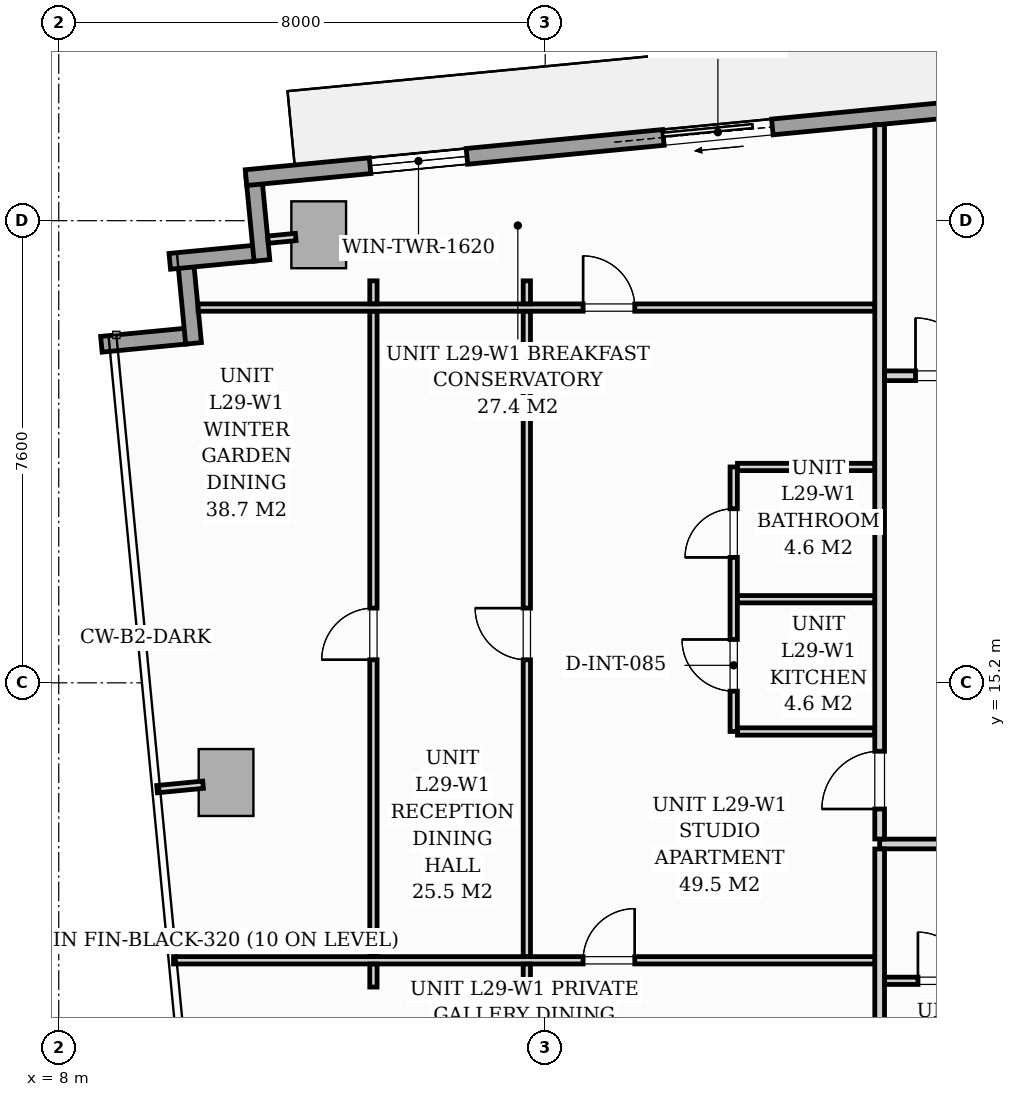
"""IFC4 building model, lengths in metres.
Left out: names, types, materials, properties, quantities, classifications, styles, units other than length and angle.
Written with IfcOpenShell. Run it as: python <this file> out.ifc"""

import sys

from ifc_helpers import new_model, si_unit, direction, frame, frame_2d, origin, origin_2d, place, context, subcontext, project, spatial, rectangle, extrude, source, transform, mapped, element, fill, save


model = new_model("IFC4")
c1 = context("Model", 3, precision=1e-05, world=origin(), true_north=direction((0.0, 1.0)))
c2 = subcontext(c1, "Body", "Model", "MODEL_VIEW")
j1 = project(units=[si_unit("LENGTHUNIT", "METRE"), si_unit("PLANEANGLEUNIT", "RADIAN")], contexts=[c1])
p1 = place(None, origin())
s1 = spatial("IfcSite", under=j1, at=p1, CompositionType="ELEMENT")
p2 = place(p1, origin())
s2 = spatial("IfcBuilding", under=s1, at=p2, CompositionType="ELEMENT")
p3 = place(p2, frame((0.0, 0.0, 103.4)))
s3 = spatial("IfcBuildingStorey", under=s2, at=p3, CompositionType="ELEMENT", Elevation=103.4)
m1 = source(origin(), c2, "Body", "SweptSolid", [
    extrude(rectangle(XDim=0.9, YDim=1.1, at=origin_2d()), origin(), (0.0, 0.0, 1.0), 3.196),
])
for number, where, z_axis, x_axis in (
    (1, (12.275, 22.568, 0.002), (0.0, 0.0, 1.0), (0.995, 0.096, 0.0)),
    (2, (10.752, 13.561, 0.002), (0.0, 0.0, 1.0), (0.995, 0.096, 0.0)),
):
    element("IfcColumn", number, at=place(p3, frame(where, z_axis=z_axis, x_axis=x_axis)), inside=s3, PredefinedType="COLUMN", context=c2, shape_type="MappedRepresentation", body=[
        mapped(m1, transform((0.0, 0.0, 0.0), scale=1.0)),
    ])
for number, where, z_axis, x_axis in (
    (3, (8.701, 20.767, 0.0), (0.0, 0.0, 1.0), (0.995, 0.096, 0.0)),
    (4, (10.217, 20.783, 0.0), (0.0, 0.0, 1.0), (-0.096, 0.995, 0.0)),
):
    element("IfcWall", number, at=place(p3, frame(where, z_axis=z_axis, x_axis=x_axis)), inside=s3, PredefinedType="STANDARD", context=c2, shape_type="SweptSolid", body=[
        extrude(rectangle(XDim=1.395, YDim=0.26, at=frame_2d((0.698, 0.0))), origin(), (0.0, 0.0, 1.0), 2.94),
    ])
p4 = place(p3, frame((9.826, 22.131, 0.0), z_axis=(0.0, 0.0, 1.0), x_axis=(0.995389446633, 0.095915846097, 0.0)))
e5 = element("IfcWall", 5, at=p4, inside=s3, PredefinedType="STANDARD", context=c2, shape_type="SweptSolid", body=[
    extrude(rectangle(XDim=1.395, YDim=0.26, at=frame_2d((0.697, 0.0))), origin(), (0.0, 0.0, 1.0), 2.94),
])
p5 = place(p3, frame((11.341, 22.147, 0.0), z_axis=(0.0, 0.0, 1.0), x_axis=(-0.09589913835, 0.995391056452, 0.0)))
e6 = element("IfcWall", 6, at=p5, inside=s3, PredefinedType="STANDARD", context=c2, shape_type="SweptSolid", body=[
    extrude(rectangle(XDim=1.395, YDim=0.26, at=frame_2d((0.698, 0.0))), origin(), (0.0, 0.0, 1.0), 2.94),
])
p6 = place(p3, frame((11.08, 23.508, 0.0), z_axis=(0.0, 0.0, 1.0), x_axis=(0.995396638587, 0.095841180552, 0.0)))
e7 = element("IfcWall", 7, at=p6, inside=s3, PredefinedType="STANDARD", context=c2, shape_type="SweptSolid", body=[
    extrude(rectangle(XDim=19.11, YDim=0.26, at=frame_2d((9.555, 0.0))), origin(), (0.0, 0.0, 1.0), 2.94),
])
p7 = place(p6, frame((6.896, 0.0, 0.0)))
e8 = element("IfcOpeningElement", 8, at=p7, cuts=e7, PredefinedType="OPENING", context=c2, shape_type="SweptSolid", body=[
    extrude(rectangle(XDim=1.8, YDim=2.06, at=frame_2d((0.9, 1.03))), frame((0.0, 0.14, 0.0), z_axis=(0.0, -1.0, 0.0), x_axis=(1.0, 0.0, 0.0)), (0.0, 0.0, 1.0), 0.28),
])
p8 = place(p6, frame((2.05, 0.0, 0.65)))
e9 = element("IfcOpeningElement", 9, at=p8, cuts=e7, PredefinedType="OPENING", context=c2, shape_type="SweptSolid", body=[
    extrude(rectangle(XDim=1.6, YDim=1.5, at=frame_2d((0.8, 0.75))), frame((0.0, 0.14, 0.0), z_axis=(0.0, -1.0, 0.0), x_axis=(1.0, 0.0, 0.0)), (0.0, 0.0, 1.0), 0.28),
])
p9 = place(p3, frame((21.5, 12.55, 0.0), z_axis=(0.0, 0.0, 1.0), x_axis=(1.0, 0.0, 0.0)))
e10 = element("IfcWall", 10, at=p9, inside=s3, PredefinedType="PARTITIONING", context=c2, shape_type="SweptSolid", body=[
    extrude(rectangle(XDim=24.38, YDim=0.16, at=frame_2d((12.19, 0.0))), origin(), (0.0, 0.0, 1.0), 2.94),
])
p10 = place(p9, frame((6.075, 0.0, 0.0)))
e11 = element("IfcOpeningElement", 11, at=p10, cuts=e10, PredefinedType="OPENING", context=c2, shape_type="SweptSolid", body=[
    extrude(rectangle(XDim=0.95, YDim=2.06, at=frame_2d((0.475, 1.03))), frame((0.0, 0.09, 0.0), z_axis=(0.0, -1.0, 0.0), x_axis=(1.0, 0.0, 0.0)), (0.0, 0.0, 1.0), 0.18),
])
p11 = place(p9, frame((10.519, 0.0, 0.0)))
e12 = element("IfcOpeningElement", 12, at=p11, cuts=e10, PredefinedType="OPENING", context=c2, shape_type="SweptSolid", body=[
    extrude(rectangle(XDim=0.95, YDim=2.06, at=frame_2d((0.475, 1.03))), frame((0.0, 0.09, 0.0), z_axis=(0.0, -1.0, 0.0), x_axis=(1.0, 0.0, 0.0)), (0.0, 0.0, 1.0), 0.18),
])
p12 = place(p9, frame((18.208, 0.0, 0.0)))
e13 = element("IfcOpeningElement", 13, at=p12, cuts=e10, PredefinedType="OPENING", context=c2, shape_type="SweptSolid", body=[
    extrude(rectangle(XDim=0.95, YDim=2.06, at=frame_2d((0.475, 1.03))), frame((0.0, 0.09, 0.0), z_axis=(0.0, -1.0, 0.0), x_axis=(1.0, 0.0, 0.0)), (0.0, 0.0, 1.0), 0.18),
])
p13 = place(p3, frame((21.5, 4.812, 0.0), z_axis=(0.0, 0.0, 1.0), x_axis=(0.0, 1.0, 0.0)))
e14 = element("IfcWall", 14, at=p13, inside=s3, PredefinedType="PARTITIONING", context=c2, shape_type="SweptSolid", body=[
    extrude(rectangle(XDim=7.656, YDim=0.16, at=frame_2d((3.828, 0.0))), origin(), (0.0, 0.0, 1.0), 2.94),
])
p14 = place(p3, frame((21.5, 12.632, 0.0), z_axis=(0.0, 0.0, 1.0), x_axis=(0.0, 1.0, 0.0)))
e15 = element("IfcWall", 15, at=p14, inside=s3, PredefinedType="PARTITIONING", context=c2, shape_type="SweptSolid", body=[
    extrude(rectangle(XDim=11.747, YDim=0.16, at=frame_2d((5.873, 0.0))), origin(), (0.0, 0.0, 1.0), 2.94),
])
p15 = place(p14, frame((0.493, 0.0, 0.0)))
e16 = element("IfcOpeningElement", 16, at=p15, cuts=e15, PredefinedType="OPENING", context=c2, shape_type="SweptSolid", body=[
    extrude(rectangle(XDim=0.95, YDim=2.06, at=frame_2d((0.475, 1.03))), frame((0.0, 0.09, 0.0), z_axis=(0.0, -1.0, 0.0), x_axis=(1.0, 0.0, 0.0)), (0.0, 0.0, 1.0), 0.18),
])
p16 = place(p3, frame((21.582, 10.3, 0.0), z_axis=(0.0, 0.0, 1.0), x_axis=(1.0, 0.0, 0.0)))
e17 = element("IfcWall", 17, at=p16, inside=s3, PredefinedType="PARTITIONING", context=c2, shape_type="SweptSolid", body=[
    extrude(rectangle(XDim=4.098, YDim=0.12, at=frame_2d((2.049, 0.0))), origin(), (0.0, 0.0, 1.0), 2.94),
])
p17 = place(p16, frame((0.548, 0.0, 0.0)))
e18 = element("IfcOpeningElement", 18, at=p17, cuts=e17, PredefinedType="OPENING", context=c2, shape_type="SweptSolid", body=[
    extrude(rectangle(XDim=0.8, YDim=2.02, at=frame_2d((0.4, 1.01))), frame((0.0, 0.07, 0.0), z_axis=(0.0, -1.0, 0.0), x_axis=(1.0, 0.0, 0.0)), (0.0, 0.0, 1.0), 0.14),
])
p18 = place(p16, frame((2.573, 0.0, 0.0)))
e19 = element("IfcOpeningElement", 19, at=p18, cuts=e17, PredefinedType="OPENING", context=c2, shape_type="SweptSolid", body=[
    extrude(rectangle(XDim=0.85, YDim=2.05, at=frame_2d((0.425, 1.025))), frame((0.0, 0.07, 0.0), z_axis=(0.0, -1.0, 0.0), x_axis=(1.0, 0.0, 0.0)), (0.0, 0.0, 1.0), 0.14),
])
p19 = place(p3, frame((19.1, 14.4, 0.0), z_axis=(0.0, 0.0, 1.0), x_axis=(0.0, 1.0, 0.0)))
e20 = element("IfcWall", 20, at=p19, inside=s3, PredefinedType="PARTITIONING", context=c2, shape_type="SweptSolid", body=[
    extrude(rectangle(XDim=4.35, YDim=0.12, at=frame_2d((2.175, 0.0))), origin(), (0.0, 0.0, 1.0), 2.94),
])
p20 = place(p19, frame((0.663, 0.0, 0.0)))
e21 = element("IfcOpeningElement", 21, at=p20, cuts=e20, PredefinedType="OPENING", context=c2, shape_type="SweptSolid", body=[
    extrude(rectangle(XDim=0.85, YDim=2.05, at=frame_2d((0.425, 1.025))), frame((0.0, 0.07, 0.0), z_axis=(0.0, -1.0, 0.0), x_axis=(1.0, 0.0, 0.0)), (0.0, 0.0, 1.0), 0.14),
])
p21 = place(p19, frame((2.863, 0.0, 0.0)))
e22 = element("IfcOpeningElement", 22, at=p21, cuts=e20, PredefinedType="OPENING", context=c2, shape_type="SweptSolid", body=[
    extrude(rectangle(XDim=0.8, YDim=2.02, at=frame_2d((0.4, 1.01))), frame((0.0, 0.07, 0.0), z_axis=(0.0, -1.0, 0.0), x_axis=(1.0, 0.0, 0.0)), (0.0, 0.0, 1.0), 0.14),
])
for number, where, z_axis, x_axis in (
    (23, (19.162, 16.575, 0.0), (0.0, 0.0, 1.0), (1.0, 0.0, 0.0)),
    (24, (19.162, 14.4, 0.0), (0.0, 0.0, 1.0), (1.0, 0.0, 0.0)),
    (25, (19.162, 18.75, 0.0), (0.0, 0.0, 1.0), (1.0, 0.0, 0.0)),
):
    element("IfcWall", number, at=place(p3, frame(where, z_axis=z_axis, x_axis=x_axis)), inside=s3, PredefinedType="PARTITIONING", context=c2, shape_type="SweptSolid", body=[
        extrude(rectangle(XDim=2.256, YDim=0.12, at=frame_2d((1.128, 0.0))), origin(), (0.0, 0.0, 1.0), 2.94),
    ])
p22 = place(p3, frame((10.293, 21.371, 0.0), z_axis=(0.0, 0.0, 1.0), x_axis=(1.0, 0.0, 0.0)))
e26 = element("IfcWall", 26, at=p22, inside=s3, PredefinedType="PARTITIONING", context=c2, shape_type="SweptSolid", body=[
    extrude(rectangle(XDim=11.125, YDim=0.12, at=frame_2d((5.562, 0.0))), origin(), (0.0, 0.0, 1.0), 2.94),
])
p23 = place(p22, frame((6.33, 0.0, 0.0)))
e27 = element("IfcOpeningElement", 27, at=p23, cuts=e26, PredefinedType="OPENING", context=c2, shape_type="SweptSolid", body=[
    extrude(rectangle(XDim=0.85, YDim=2.05, at=frame_2d((0.425, 1.025))), frame((0.0, 0.07, 0.0), z_axis=(0.0, -1.0, 0.0), x_axis=(1.0, 0.0, 0.0)), (0.0, 0.0, 1.0), 0.14),
])
p24 = place(p3, frame((9.888, 10.637, 0.0), z_axis=(0.0, 0.0, 1.0), x_axis=(1.0, 0.0, 0.0)))
e28 = element("IfcWall", 28, at=p24, inside=s3, PredefinedType="PARTITIONING", context=c2, shape_type="SweptSolid", body=[
    extrude(rectangle(XDim=11.53, YDim=0.12, at=frame_2d((5.765, 0.0))), origin(), (0.0, 0.0, 1.0), 2.94),
])
p25 = place(p24, frame((6.735, 0.0, 0.0)))
e29 = element("IfcOpeningElement", 29, at=p25, cuts=e28, PredefinedType="OPENING", context=c2, shape_type="SweptSolid", body=[
    extrude(rectangle(XDim=0.85, YDim=2.05, at=frame_2d((0.425, 1.025))), frame((0.0, 0.07, 0.0), z_axis=(0.0, -1.0, 0.0), x_axis=(1.0, 0.0, 0.0)), (0.0, 0.0, 1.0), 0.14),
])
p26 = place(p3, frame((13.175, 10.197, 0.0), z_axis=(0.0, 0.0, 1.0), x_axis=(0.0, 1.0, 0.0)))
e30 = element("IfcWall", 30, at=p26, inside=s3, PredefinedType="PARTITIONING", context=c2, shape_type="SweptSolid", body=[
    extrude(rectangle(XDim=0.378, YDim=0.12, at=frame_2d((0.189, 0.0))), origin(), (0.0, 0.0, 1.0), 2.94),
])
p27 = place(p3, frame((13.175, 10.699, 0.0), z_axis=(0.0, 0.0, 1.0), x_axis=(0.0, 1.0, 0.0)))
e31 = element("IfcWall", 31, at=p27, inside=s3, PredefinedType="PARTITIONING", context=c2, shape_type="SweptSolid", body=[
    extrude(rectangle(XDim=10.61, YDim=0.12, at=frame_2d((5.305, 0.0))), origin(), (0.0, 0.0, 1.0), 2.94),
])
p28 = place(p27, frame((4.88, 0.0, 0.0)))
e32 = element("IfcOpeningElement", 32, at=p28, cuts=e31, PredefinedType="OPENING", context=c2, shape_type="SweptSolid", body=[
    extrude(rectangle(XDim=0.85, YDim=2.05, at=frame_2d((0.425, 1.025))), frame((0.0, 0.07, 0.0), z_axis=(0.0, -1.0, 0.0), x_axis=(1.0, 0.0, 0.0)), (0.0, 0.0, 1.0), 0.14),
])
for number, where, z_axis, x_axis in (
    (33, (13.175, 21.433, 0.0), (0.0, 0.0, 1.0), (0.0, 1.0, 0.0)),
    (34, (15.698, 10.197, 0.0), (0.0, 0.0, 1.0), (0.0, 1.0, 0.0)),
):
    element("IfcWall", number, at=place(p3, frame(where, z_axis=z_axis, x_axis=x_axis)), inside=s3, PredefinedType="PARTITIONING", context=c2, shape_type="SweptSolid", body=[
        extrude(rectangle(XDim=0.378, YDim=0.12, at=frame_2d((0.189, 0.0))), origin(), (0.0, 0.0, 1.0), 2.94),
    ])
p29 = place(p3, frame((15.698, 10.699, 0.0), z_axis=(0.0, 0.0, 1.0), x_axis=(0.0, 1.0, 0.0)))
e35 = element("IfcWall", 35, at=p29, inside=s3, PredefinedType="PARTITIONING", context=c2, shape_type="SweptSolid", body=[
    extrude(rectangle(XDim=10.61, YDim=0.12, at=frame_2d((5.305, 0.0))), origin(), (0.0, 0.0, 1.0), 2.94),
])
p30 = place(p29, frame((4.88, 0.0, 0.0)))
e36 = element("IfcOpeningElement", 36, at=p30, cuts=e35, PredefinedType="OPENING", context=c2, shape_type="SweptSolid", body=[
    extrude(rectangle(XDim=0.85, YDim=2.05, at=frame_2d((0.425, 1.025))), frame((0.0, 0.07, 0.0), z_axis=(0.0, -1.0, 0.0), x_axis=(1.0, 0.0, 0.0)), (0.0, 0.0, 1.0), 0.14),
])
p31 = place(p3, frame((15.698, 21.433, 0.0), z_axis=(0.0, 0.0, 1.0), x_axis=(0.0, 1.0, 0.0)))
e37 = element("IfcWall", 37, at=p31, inside=s3, PredefinedType="PARTITIONING", context=c2, shape_type="SweptSolid", body=[
    extrude(rectangle(XDim=0.378, YDim=0.12, at=frame_2d((0.189, 0.0))), origin(), (0.0, 0.0, 1.0), 2.94),
])
p32 = place(p3, frame((21.582, 20.25, 0.0), z_axis=(0.0, 0.0, 1.0), x_axis=(1.0, 0.0, 0.0)))
e38 = element("IfcWall", 38, at=p32, inside=s3, PredefinedType="PARTITIONING", context=c2, shape_type="SweptSolid", body=[
    extrude(rectangle(XDim=1.886, YDim=0.16, at=frame_2d((0.943, 0.0))), origin(), (0.0, 0.0, 1.0), 2.94),
])
p33 = place(p32, frame((0.508, 0.0, 0.0)))
e39 = element("IfcOpeningElement", 39, at=p33, cuts=e38, PredefinedType="OPENING", context=c2, shape_type="SweptSolid", body=[
    extrude(rectangle(XDim=0.95, YDim=2.06, at=frame_2d((0.475, 1.03))), frame((0.0, 0.09, 0.0), z_axis=(0.0, -1.0, 0.0), x_axis=(1.0, 0.0, 0.0)), (0.0, 0.0, 1.0), 0.18),
])
p34 = place(p3, frame((11.897, 22.532, 0.0), z_axis=(0.0, 0.0, 1.0), x_axis=(-0.995384576284, -0.09596637586, 0.0)))
e40 = element("IfcWall", 40, at=p34, inside=s3, PredefinedType="PARTITIONING", context=c2, shape_type="SweptSolid", body=[
    extrude(rectangle(XDim=0.458, YDim=0.12, at=frame_2d((0.229, 0.0))), origin(), (0.0, 0.0, 1.0), 2.94),
])
p35 = place(p3, frame((10.373, 13.524, 0.0), z_axis=(0.0, 0.0, 1.0), x_axis=(-0.995377786728, -0.096036772582, 0.0)))
e41 = element("IfcWall", 41, at=p35, inside=s3, PredefinedType="PARTITIONING", context=c2, shape_type="SweptSolid", body=[
    extrude(rectangle(XDim=0.76, YDim=0.12, at=frame_2d((0.38, 0.0))), origin(), (0.0, 0.0, 1.0), 2.94),
])
m2 = source(origin(), c2, "Body", "SweptSolid", [
    extrude(rectangle(XDim=1.8, YDim=2.06, at=frame_2d((0.9, 1.03))), frame((0.0, 0.025, 0.0), z_axis=(0.0, -1.0, 0.0), x_axis=(1.0, 0.0, 0.0)), (0.0, 0.0, 1.0), 0.05),
])
p36 = place(p7, origin())
e42 = element("IfcDoor", 42, at=p36, inside=s3, OperationType="SLIDING_TO_LEFT", PredefinedType="DOOR", context=c2, shape_type="MappedRepresentation", body=[
    mapped(m2, transform((0.0, 0.0, 0.0), scale=1.0)),
])
fill(e8, e42)
m3 = source(origin(), c2, "Body", "SweptSolid", [
    extrude(rectangle(XDim=1.6, YDim=1.5, at=frame_2d((0.8, 0.75))), frame((0.0, 0.03, 0.0), z_axis=(0.0, -1.0, 0.0), x_axis=(1.0, 0.0, 0.0)), (0.0, 0.0, 1.0), 0.06),
])
p37 = place(p8, origin())
e43 = element("IfcWindow", 43, at=p37, inside=s3, PartitioningType="SINGLE_PANEL", PredefinedType="WINDOW", context=c2, shape_type="MappedRepresentation", body=[
    mapped(m3, transform((0.0, 0.0, 0.0), scale=1.0)),
])
fill(e9, e43)
m4 = source(origin(), c2, "Body", "SweptSolid", [
    extrude(rectangle(XDim=0.8, YDim=2.02, at=frame_2d((0.4, 1.01))), frame((0.0, 0.025, 0.0), z_axis=(0.0, -1.0, 0.0), x_axis=(1.0, 0.0, 0.0)), (0.0, 0.0, 1.0), 0.05),
])
p38 = place(p17, origin())
e44 = element("IfcDoor", 44, at=p38, inside=s3, OperationType="SINGLE_SWING_LEFT", PredefinedType="DOOR", context=c2, shape_type="MappedRepresentation", body=[
    mapped(m4, transform((0.0, 0.0, 0.0), scale=1.0)),
])
fill(e18, e44)
m5 = source(origin(), c2, "Body", "SweptSolid", [
    extrude(rectangle(XDim=0.95, YDim=2.06, at=frame_2d((0.475, 1.03))), frame((0.0, 0.025, 0.0), z_axis=(0.0, -1.0, 0.0), x_axis=(1.0, 0.0, 0.0)), (0.0, 0.0, 1.0), 0.05),
])
p39 = place(p15, origin())
e45 = element("IfcDoor", 45, at=p39, inside=s3, OperationType="SINGLE_SWING_LEFT", PredefinedType="DOOR", context=c2, shape_type="MappedRepresentation", body=[
    mapped(m5, transform((0.0, 0.0, 0.0), scale=1.0)),
])
fill(e16, e45)
m6 = source(origin(), c2, "Body", "SweptSolid", [
    extrude(rectangle(XDim=0.85, YDim=2.05, at=frame_2d((0.425, 1.025))), frame((0.0, 0.025, 0.0), z_axis=(0.0, -1.0, 0.0), x_axis=(1.0, 0.0, 0.0)), (0.0, 0.0, 1.0), 0.05),
])
p40 = place(p20, origin())
e46 = element("IfcDoor", 46, at=p40, inside=s3, OperationType="SINGLE_SWING_RIGHT", PredefinedType="DOOR", context=c2, shape_type="MappedRepresentation", body=[
    mapped(m6, transform((0.0, 0.0, 0.0), scale=1.0)),
])
fill(e21, e46)
p41 = place(p21, origin())
e47 = element("IfcDoor", 47, at=p41, inside=s3, OperationType="SINGLE_SWING_LEFT", PredefinedType="DOOR", context=c2, shape_type="MappedRepresentation", body=[
    mapped(m4, transform((0.0, 0.0, 0.0), scale=1.0)),
])
fill(e22, e47)
p42 = place(p23, origin())
e48 = element("IfcDoor", 48, at=p42, inside=s3, OperationType="SINGLE_SWING_LEFT", PredefinedType="DOOR", context=c2, shape_type="MappedRepresentation", body=[
    mapped(m6, transform((0.0, 0.0, 0.0), scale=1.0)),
])
fill(e27, e48)
p43 = place(p25, origin())
e49 = element("IfcDoor", 49, at=p43, inside=s3, OperationType="SINGLE_SWING_RIGHT", PredefinedType="DOOR", context=c2, shape_type="MappedRepresentation", body=[
    mapped(m6, transform((0.0, 0.0, 0.0), scale=1.0)),
])
fill(e29, e49)
p44 = place(p28, origin())
e50 = element("IfcDoor", 50, at=p44, inside=s3, OperationType="SINGLE_SWING_LEFT", PredefinedType="DOOR", context=c2, shape_type="MappedRepresentation", body=[
    mapped(m6, transform((0.0, 0.0, 0.0), scale=1.0)),
])
fill(e32, e50)
p45 = place(p30, origin())
e51 = element("IfcDoor", 51, at=p45, inside=s3, OperationType="SINGLE_SWING_RIGHT", PredefinedType="DOOR", context=c2, shape_type="MappedRepresentation", body=[
    mapped(m6, transform((0.0, 0.0, 0.0), scale=1.0)),
])
fill(e36, e51)
p46 = place(p33, origin())
e52 = element("IfcDoor", 52, at=p46, inside=s3, OperationType="SINGLE_SWING_LEFT", PredefinedType="DOOR", context=c2, shape_type="MappedRepresentation", body=[
    mapped(m5, transform((0.0, 0.0, 0.0), scale=1.0)),
])
fill(e39, e52)
save(model, sys.argv[1])
